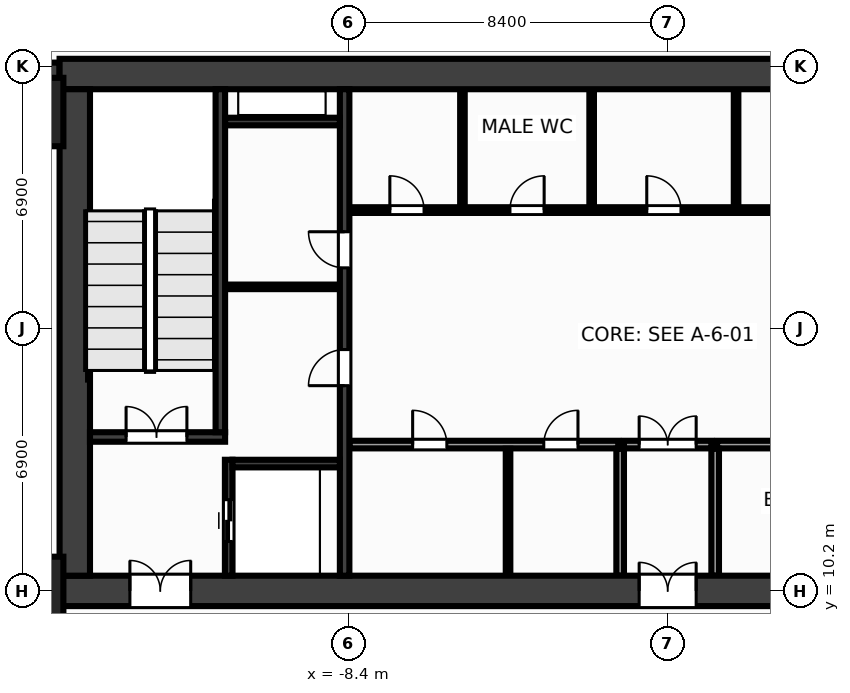
"""IFC4 building model, lengths in metres.
Left out: names, types, materials, properties, quantities, classifications, styles, units other than length and angle.
Written with IfcOpenShell. Run it as: python <this file> out.ifc"""

import sys

from ifc_helpers import new_model, si_unit, direction, frame, frame_2d, origin, origin_2d, place, context, subcontext, project, spatial, rectangle, extrude, source, transform, mapped, element, fill, save


model = new_model("IFC4")
c1 = context("Model", 3, precision=1e-05, world=origin(), true_north=direction((0.0, 1.0)))
c2 = subcontext(c1, "Body", "Model", "MODEL_VIEW")
j1 = project(units=[si_unit("LENGTHUNIT", "METRE"), si_unit("PLANEANGLEUNIT", "RADIAN")], contexts=[c1])
p1 = place(None, origin())
s1 = spatial("IfcSite", under=j1, at=p1, CompositionType="ELEMENT")
p2 = place(p1, origin())
s2 = spatial("IfcBuilding", under=s1, at=p2, CompositionType="ELEMENT")
p3 = place(p2, frame((0.0, 0.0, -5.5)))
s3 = spatial("IfcBuildingStorey", under=s2, at=p3, CompositionType="ELEMENT", Elevation=-5.5)
m1 = source(origin(), c2, "Body", "SweptSolid", [
    extrude(rectangle(XDim=22.9, YDim=0.6, at=frame_2d((11.45, 0.0))), origin(), (0.0, 0.0, 1.0), 5.5),
])
p4 = place(p3, frame((-38.9, 23.8, 0.0), z_axis=(0.0, 0.0, 1.0), x_axis=(1.0, 0.0, 0.0)))
e1 = element("IfcWall", 1, at=p4, inside=s3, PredefinedType="SHEAR", context=c2, shape_type="MappedRepresentation", body=[
    mapped(m1, transform((0.0, 0.0, 0.0), x_axis=(1.0, 0.0, 0.0), y_axis=(0.0, 1.0, 0.0), z_axis=(0.0, 0.0, 1.0), scale=1.0)),
])
m2 = source(origin(), c2, "Body", "SweptSolid", [
    extrude(rectangle(XDim=32.0, YDim=0.8, at=frame_2d((16.0, 0.0))), origin(), (0.0, 0.0, 1.0), 5.5),
])
p5 = place(p3, frame((-16.0, 23.8, 0.0), z_axis=(0.0, 0.0, 1.0), x_axis=(1.0, 0.0, 0.0)))
e2 = element("IfcWall", 2, at=p5, inside=s3, PredefinedType="SHEAR", context=c2, shape_type="MappedRepresentation", body=[
    mapped(m2, transform((0.0, 0.0, 0.0), x_axis=(1.0, 0.0, 0.0), y_axis=(0.0, 1.0, 0.0), z_axis=(0.0, 0.0, 1.0), scale=1.0)),
])
p6 = place(p3, frame((-16.0, 10.2, 0.0), z_axis=(0.0, 0.0, 1.0), x_axis=(1.0, 0.0, 0.0)))
e3 = element("IfcWall", 3, at=p6, inside=s3, PredefinedType="SHEAR", context=c2, shape_type="MappedRepresentation", body=[
    mapped(m2, transform((0.0, 0.0, 0.0), x_axis=(1.0, 0.0, 0.0), y_axis=(0.0, 1.0, 0.0), z_axis=(0.0, 0.0, 1.0), scale=1.0)),
])
p7 = place(p6, frame((1.85, 0.0, 0.0)))
e4 = element("IfcOpeningElement", 4, at=p7, cuts=e3, PredefinedType="OPENING", context=c2, shape_type="SweptSolid", body=[
    extrude(rectangle(XDim=1.6, YDim=2.15, at=frame_2d((0.8, 1.075))), frame((0.0, 0.412, 0.0), z_axis=(0.0, -1.0, 0.0), x_axis=(1.0, 0.0, 0.0)), (0.0, 0.0, 1.0), 0.824),
])
p8 = place(p6, frame((28.55, 0.0, 0.0)))
e5 = element("IfcOpeningElement", 5, at=p8, cuts=e3, PredefinedType="OPENING", context=c2, shape_type="SweptSolid", body=[
    extrude(rectangle(XDim=1.6, YDim=2.15, at=frame_2d((0.8, 1.075))), frame((0.0, 0.412, 0.0), z_axis=(0.0, -1.0, 0.0), x_axis=(1.0, 0.0, 0.0)), (0.0, 0.0, 1.0), 0.824),
])
p9 = place(p6, frame((15.25, 0.0, 0.0)))
e6 = element("IfcOpeningElement", 6, at=p9, cuts=e3, PredefinedType="OPENING", context=c2, shape_type="SweptSolid", body=[
    extrude(rectangle(XDim=1.5, YDim=2.2, at=frame_2d((0.75, 1.1))), frame((0.0, 0.412, 0.0), z_axis=(0.0, -1.0, 0.0), x_axis=(1.0, 0.0, 0.0)), (0.0, 0.0, 1.0), 0.824),
])
m3 = source(origin(), c2, "Body", "SweptSolid", [
    extrude(rectangle(XDim=12.8, YDim=0.8, at=frame_2d((6.4, 0.0))), origin(), (0.0, 0.0, 1.0), 5.5),
])
p10 = place(p3, frame((-15.6, 10.6, 0.0), z_axis=(0.0, 0.0, 1.0), x_axis=(0.0, 1.0, 0.0)))
e7 = element("IfcWall", 7, at=p10, inside=s3, PredefinedType="SHEAR", context=c2, shape_type="MappedRepresentation", body=[
    mapped(m3, transform((0.0, 0.0, 0.0), x_axis=(1.0, 0.0, 0.0), y_axis=(0.0, 1.0, 0.0), z_axis=(0.0, 0.0, 1.0), scale=1.0)),
])
m4 = source(origin(), c2, "Body", "SweptSolid", [
    extrude(rectangle(XDim=12.8, YDim=0.25, at=frame_2d((6.4, 0.0))), origin(), (0.0, 0.0, 1.0), 5.5),
])
p11 = place(p3, frame((-8.5, 10.6, 0.0), z_axis=(0.0, 0.0, 1.0), x_axis=(0.0, 1.0, 0.0)))
e8 = element("IfcWall", 8, at=p11, inside=s3, PredefinedType="SHEAR", context=c2, shape_type="MappedRepresentation", body=[
    mapped(m4, transform((0.0, 0.0, 0.0), x_axis=(1.0, 0.0, 0.0), y_axis=(0.0, 1.0, 0.0), z_axis=(0.0, 0.0, 1.0), scale=1.0)),
])
p12 = place(p11, frame((5.0, 0.0, 0.0)))
e9 = element("IfcOpeningElement", 9, at=p12, cuts=e8, PredefinedType="OPENING", context=c2, shape_type="SweptSolid", body=[
    extrude(rectangle(XDim=0.95, YDim=2.15, at=frame_2d((0.475, 1.075))), frame((0.0, 0.137, 0.0), z_axis=(0.0, -1.0, 0.0), x_axis=(1.0, 0.0, 0.0)), (0.0, 0.0, 1.0), 0.274),
])
p13 = place(p11, frame((8.1, 0.0, 0.0)))
e10 = element("IfcOpeningElement", 10, at=p13, cuts=e8, PredefinedType="OPENING", context=c2, shape_type="SweptSolid", body=[
    extrude(rectangle(XDim=0.95, YDim=2.15, at=frame_2d((0.475, 1.075))), frame((0.0, 0.137, 0.0), z_axis=(0.0, -1.0, 0.0), x_axis=(1.0, 0.0, 0.0)), (0.0, 0.0, 1.0), 0.274),
])
m5 = source(origin(), c2, "Body", "SweptSolid", [
    extrude(rectangle(XDim=3.555, YDim=0.25, at=frame_2d((1.777, 0.0))), origin(), (0.0, 0.0, 1.0), 5.5),
])
p14 = place(p3, frame((-15.2, 14.25, 0.0), z_axis=(0.0, 0.0, 1.0), x_axis=(1.0, 0.0, 0.0)))
e11 = element("IfcWall", 11, at=p14, inside=s3, PredefinedType="SHEAR", context=c2, shape_type="MappedRepresentation", body=[
    mapped(m5, transform((0.0, 0.0, 0.0), x_axis=(1.0, 0.0, 0.0), y_axis=(0.0, 1.0, 0.0), z_axis=(0.0, 0.0, 1.0), scale=1.0)),
])
p15 = place(p14, frame((0.95, 0.0, 0.0)))
e12 = element("IfcOpeningElement", 12, at=p15, cuts=e11, PredefinedType="OPENING", context=c2, shape_type="SweptSolid", body=[
    extrude(rectangle(XDim=1.6, YDim=2.15, at=frame_2d((0.8, 1.075))), frame((0.0, 0.137, 0.0), z_axis=(0.0, -1.0, 0.0), x_axis=(1.0, 0.0, 0.0)), (0.0, 0.0, 1.0), 0.274),
])
m6 = source(origin(), c2, "Body", "SweptSolid", [
    extrude(rectangle(XDim=9.025, YDim=0.25, at=frame_2d((4.512, 0.0))), origin(), (0.0, 0.0, 1.0), 5.5),
])
p16 = place(p3, frame((-11.77, 14.375, 0.0), z_axis=(0.0, 0.0, 1.0), x_axis=(0.0, 1.0, 0.0)))
e13 = element("IfcWall", 13, at=p16, inside=s3, PredefinedType="SHEAR", context=c2, shape_type="MappedRepresentation", body=[
    mapped(m6, transform((0.0, 0.0, 0.0), x_axis=(1.0, 0.0, 0.0), y_axis=(0.0, 1.0, 0.0), z_axis=(0.0, 0.0, 1.0), scale=1.0)),
])
m7 = source(origin(), c2, "Body", "SweptSolid", [
    extrude(rectangle(XDim=3.05, YDim=0.2, at=frame_2d((1.525, 0.0))), origin(), (0.0, 0.0, 1.0), 5.5),
])
p17 = place(p3, frame((-11.55, 10.6, 0.0), z_axis=(0.0, 0.0, 1.0), x_axis=(0.0, 1.0, 0.0)))
e14 = element("IfcWall", 14, at=p17, inside=s3, PredefinedType="SHEAR", context=c2, shape_type="MappedRepresentation", body=[
    mapped(m7, transform((0.0, 0.0, 0.0), x_axis=(1.0, 0.0, 0.0), y_axis=(0.0, 1.0, 0.0), z_axis=(0.0, 0.0, 1.0), scale=1.0)),
])
p18 = place(p17, frame((0.9, 0.0, 0.0)))
e15 = element("IfcOpeningElement", 15, at=p18, cuts=e14, PredefinedType="OPENING", context=c2, shape_type="SweptSolid", body=[
    extrude(rectangle(XDim=1.1, YDim=2.15, at=frame_2d((0.55, 1.075))), frame((0.0, 0.112, 0.0), z_axis=(0.0, -1.0, 0.0), x_axis=(1.0, 0.0, 0.0)), (0.0, 0.0, 1.0), 0.224),
])
m8 = source(origin(), c2, "Body", "SweptSolid", [
    extrude(rectangle(XDim=2.825, YDim=0.2, at=frame_2d((1.413, 0.0))), origin(), (0.0, 0.0, 1.0), 5.5),
])
p19 = place(p3, frame((-11.45, 13.55, 0.0), z_axis=(0.0, 0.0, 1.0), x_axis=(1.0, 0.0, 0.0)))
e16 = element("IfcWall", 16, at=p19, inside=s3, PredefinedType="SHEAR", context=c2, shape_type="MappedRepresentation", body=[
    mapped(m8, transform((0.0, 0.0, 0.0), x_axis=(1.0, 0.0, 0.0), y_axis=(0.0, 1.0, 0.0), z_axis=(0.0, 0.0, 1.0), scale=1.0)),
])
m9 = source(origin(), c2, "Body", "SweptSolid", [
    extrude(rectangle(XDim=3.02, YDim=0.2, at=frame_2d((1.51, 0.0))), origin(), (0.0, 0.0, 1.0), 5.5),
])
p20 = place(p3, frame((-11.645, 22.55, 0.0), z_axis=(0.0, 0.0, 1.0), x_axis=(1.0, 0.0, 0.0)))
e17 = element("IfcWall", 17, at=p20, inside=s3, PredefinedType="SHEAR", context=c2, shape_type="MappedRepresentation", body=[
    mapped(m9, transform((0.0, 0.0, 0.0), x_axis=(1.0, 0.0, 0.0), y_axis=(0.0, 1.0, 0.0), z_axis=(0.0, 0.0, 1.0), scale=1.0)),
])
m10 = source(origin(), c2, "Body", "SweptSolid", [
    extrude(rectangle(XDim=1.8, YDim=1.8, at=origin_2d()), origin(), (0.0, 0.0, 1.0), 5.5),
])
for number, where, z_axis, x_axis in (
    (18, (-16.8, 10.2, 0.0), (0.0, 0.0, 1.0), (1.0, 0.0, 0.0)),
    (19, (-16.8, 22.8, 0.0), (0.0, 0.0, 1.0), (1.0, 0.0, 0.0)),
):
    element("IfcColumn", number, at=place(p3, frame(where, z_axis=z_axis, x_axis=x_axis)), inside=s3, PredefinedType="COLUMN", context=c2, shape_type="MappedRepresentation", body=[
        mapped(m10, transform((0.0, 0.0, 0.0), x_axis=(1.0, 0.0, 0.0), y_axis=(0.0, 1.0, 0.0), z_axis=(0.0, 0.0, 1.0), scale=1.0)),
    ])
m11 = source(origin(), c2, "Body", "SweptSolid", [
    extrude(rectangle(XDim=3.01, YDim=0.12, at=frame_2d((1.505, 0.0))), origin(), (0.0, 0.0, 1.0), 5.14),
])
p21 = place(p3, frame((-11.64, 18.2, 0.0), z_axis=(0.0, 0.0, 1.0), x_axis=(1.0, 0.0, 0.0)))
e20 = element("IfcWall", 20, at=p21, inside=s3, PredefinedType="PARTITIONING", context=c2, shape_type="MappedRepresentation", body=[
    mapped(m11, transform((0.0, 0.0, 0.0), x_axis=(1.0, 0.0, 0.0), y_axis=(0.0, 1.0, 0.0), z_axis=(0.0, 0.0, 1.0), scale=1.0)),
])
m12 = source(origin(), c2, "Body", "SweptSolid", [
    extrude(rectangle(XDim=7.07, YDim=0.2, at=frame_2d((3.535, 0.0))), origin(), (0.0, 0.0, 1.0), 5.14),
])
p22 = place(p3, frame((-8.37, 14.05, 0.0), z_axis=(0.0, 0.0, 1.0), x_axis=(1.0, 0.0, 0.0)))
e21 = element("IfcWall", 21, at=p22, inside=s3, PredefinedType="PARTITIONING", context=c2, shape_type="MappedRepresentation", body=[
    mapped(m12, transform((0.0, 0.0, 0.0), x_axis=(1.0, 0.0, 0.0), y_axis=(0.0, 1.0, 0.0), z_axis=(0.0, 0.0, 1.0), scale=1.0)),
])
p23 = place(p22, frame((1.66, 0.0, 0.0)))
e22 = element("IfcOpeningElement", 22, at=p23, cuts=e21, PredefinedType="OPENING", context=c2, shape_type="SweptSolid", body=[
    extrude(rectangle(XDim=0.9, YDim=2.15, at=frame_2d((0.45, 1.075))), frame((0.0, 0.112, 0.0), z_axis=(0.0, -1.0, 0.0), x_axis=(1.0, 0.0, 0.0)), (0.0, 0.0, 1.0), 0.224),
])
p24 = place(p22, frame((5.11, 0.0, 0.0)))
e23 = element("IfcOpeningElement", 23, at=p24, cuts=e21, PredefinedType="OPENING", context=c2, shape_type="SweptSolid", body=[
    extrude(rectangle(XDim=0.9, YDim=2.15, at=frame_2d((0.45, 1.075))), frame((0.0, 0.112, 0.0), z_axis=(0.0, -1.0, 0.0), x_axis=(1.0, 0.0, 0.0)), (0.0, 0.0, 1.0), 0.224),
])
p25 = place(p3, frame((1.3, 14.05, 0.0), z_axis=(0.0, 0.0, 1.0), x_axis=(1.0, 0.0, 0.0)))
e24 = element("IfcWall", 24, at=p25, inside=s3, PredefinedType="PARTITIONING", context=c2, shape_type="MappedRepresentation", body=[
    mapped(m12, transform((0.0, 0.0, 0.0), x_axis=(1.0, 0.0, 0.0), y_axis=(0.0, 1.0, 0.0), z_axis=(0.0, 0.0, 1.0), scale=1.0)),
])
p26 = place(p25, frame((2.8, 0.0, 0.0)))
e25 = element("IfcOpeningElement", 25, at=p26, cuts=e24, PredefinedType="OPENING", context=c2, shape_type="SweptSolid", body=[
    extrude(rectangle(XDim=0.98, YDim=2.15, at=frame_2d((0.49, 1.075))), frame((0.0, 0.112, 0.0), z_axis=(0.0, -1.0, 0.0), x_axis=(1.0, 0.0, 0.0)), (0.0, 0.0, 1.0), 0.224),
])
m13 = source(origin(), c2, "Body", "SweptSolid", [
    extrude(rectangle(XDim=3.34, YDim=0.2, at=frame_2d((1.67, 0.0))), origin(), (0.0, 0.0, 1.0), 5.14),
])
for number, where, z_axis, x_axis in (
    (26, (-1.25, 10.6, 0.0), (0.0, 0.0, 1.0), (0.0, 1.0, 0.0)),
    (27, (1.25, 10.6, 0.0), (0.0, 0.0, 1.0), (0.0, 1.0, 0.0)),
):
    element("IfcWall", number, at=place(p3, frame(where, z_axis=z_axis, x_axis=x_axis)), inside=s3, PredefinedType="PARTITIONING", context=c2, shape_type="MappedRepresentation", body=[
        mapped(m13, transform((0.0, 0.0, 0.0), x_axis=(1.0, 0.0, 0.0), y_axis=(0.0, 1.0, 0.0), z_axis=(0.0, 0.0, 1.0), scale=1.0)),
    ])
m14 = source(origin(), c2, "Body", "SweptSolid", [
    extrude(rectangle(XDim=2.3, YDim=0.2, at=frame_2d((1.15, 0.0))), origin(), (0.0, 0.0, 1.0), 5.14),
])
p27 = place(p3, frame((-1.15, 14.05, 0.0), z_axis=(0.0, 0.0, 1.0), x_axis=(1.0, 0.0, 0.0)))
e28 = element("IfcWall", 28, at=p27, inside=s3, PredefinedType="PARTITIONING", context=c2, shape_type="MappedRepresentation", body=[
    mapped(m14, transform((0.0, 0.0, 0.0), x_axis=(1.0, 0.0, 0.0), y_axis=(0.0, 1.0, 0.0), z_axis=(0.0, 0.0, 1.0), scale=1.0)),
])
p28 = place(p27, frame((0.4, 0.0, 0.0)))
e29 = element("IfcOpeningElement", 29, at=p28, cuts=e28, PredefinedType="OPENING", context=c2, shape_type="SweptSolid", body=[
    extrude(rectangle(XDim=1.5, YDim=2.2, at=frame_2d((0.75, 1.1))), frame((0.0, 0.112, 0.0), z_axis=(0.0, -1.0, 0.0), x_axis=(1.0, 0.0, 0.0)), (0.0, 0.0, 1.0), 0.224),
])
m15 = source(origin(), c2, "Body", "SweptSolid", [
    extrude(rectangle(XDim=14.59, YDim=0.15, at=frame_2d((7.295, 0.0))), origin(), (0.0, 0.0, 1.0), 5.14),
])
p29 = place(p3, frame((-8.37, 20.22, 0.0), z_axis=(0.0, 0.0, 1.0), x_axis=(1.0, 0.0, 0.0)))
e30 = element("IfcWall", 30, at=p29, inside=s3, PredefinedType="PARTITIONING", context=c2, shape_type="MappedRepresentation", body=[
    mapped(m15, transform((0.0, 0.0, 0.0), x_axis=(1.0, 0.0, 0.0), y_axis=(0.0, 1.0, 0.0), z_axis=(0.0, 0.0, 1.0), scale=1.0)),
])
p30 = place(p29, frame((1.06, 0.0, 0.0)))
e31 = element("IfcOpeningElement", 31, at=p30, cuts=e30, PredefinedType="OPENING", context=c2, shape_type="SweptSolid", body=[
    extrude(rectangle(XDim=0.9, YDim=2.15, at=frame_2d((0.45, 1.075))), frame((0.0, 0.087, 0.0), z_axis=(0.0, -1.0, 0.0), x_axis=(1.0, 0.0, 0.0)), (0.0, 0.0, 1.0), 0.174),
])
p31 = place(p29, frame((4.22, 0.0, 0.0)))
e32 = element("IfcOpeningElement", 32, at=p31, cuts=e30, PredefinedType="OPENING", context=c2, shape_type="SweptSolid", body=[
    extrude(rectangle(XDim=0.9, YDim=2.15, at=frame_2d((0.45, 1.075))), frame((0.0, 0.087, 0.0), z_axis=(0.0, -1.0, 0.0), x_axis=(1.0, 0.0, 0.0)), (0.0, 0.0, 1.0), 0.174),
])
p32 = place(p29, frame((7.82, 0.0, 0.0)))
e33 = element("IfcOpeningElement", 33, at=p32, cuts=e30, PredefinedType="OPENING", context=c2, shape_type="SweptSolid", body=[
    extrude(rectangle(XDim=0.9, YDim=2.15, at=frame_2d((0.45, 1.075))), frame((0.0, 0.087, 0.0), z_axis=(0.0, -1.0, 0.0), x_axis=(1.0, 0.0, 0.0)), (0.0, 0.0, 1.0), 0.174),
])
p33 = place(p29, frame((11.87, 0.0, 0.0)))
e34 = element("IfcOpeningElement", 34, at=p33, cuts=e30, PredefinedType="OPENING", context=c2, shape_type="SweptSolid", body=[
    extrude(rectangle(XDim=0.9, YDim=2.15, at=frame_2d((0.45, 1.075))), frame((0.0, 0.087, 0.0), z_axis=(0.0, -1.0, 0.0), x_axis=(1.0, 0.0, 0.0)), (0.0, 0.0, 1.0), 0.174),
])
m16 = source(origin(), c2, "Body", "SweptSolid", [
    extrude(rectangle(XDim=3.34, YDim=0.12, at=frame_2d((1.67, 0.0))), origin(), (0.0, 0.0, 1.0), 5.14),
])
p34 = place(p3, frame((-4.2, 10.6, 0.0), z_axis=(0.0, 0.0, 1.0), x_axis=(0.0, 1.0, 0.0)))
e35 = element("IfcWall", 35, at=p34, inside=s3, PredefinedType="PARTITIONING", context=c2, shape_type="MappedRepresentation", body=[
    mapped(m16, transform((0.0, 0.0, 0.0), x_axis=(1.0, 0.0, 0.0), y_axis=(0.0, 1.0, 0.0), z_axis=(0.0, 0.0, 1.0), scale=1.0)),
])
m17 = source(origin(), c2, "Body", "SweptSolid", [
    extrude(rectangle(XDim=3.04, YDim=0.12, at=frame_2d((1.52, 0.0))), origin(), (0.0, 0.0, 1.0), 5.14),
])
for number, where, z_axis, x_axis in (
    (36, (-5.4, 20.32, 0.0), (0.0, 0.0, 1.0), (0.0, 1.0, 0.0)),
    (37, (-2.0, 20.32, 0.0), (0.0, 0.0, 1.0), (0.0, 1.0, 0.0)),
    (38, (1.8, 20.32, 0.0), (0.0, 0.0, 1.0), (0.0, 1.0, 0.0)),
):
    element("IfcWall", number, at=place(p3, frame(where, z_axis=z_axis, x_axis=x_axis)), inside=s3, PredefinedType="PARTITIONING", context=c2, shape_type="MappedRepresentation", body=[
        mapped(m17, transform((0.0, 0.0, 0.0), x_axis=(1.0, 0.0, 0.0), y_axis=(0.0, 1.0, 0.0), z_axis=(0.0, 0.0, 1.0), scale=1.0)),
    ])
m18 = source(origin(), c2, "Body", "SweptSolid", [
    extrude(rectangle(XDim=1.6, YDim=2.15, at=frame_2d((0.8, 1.075))), frame((0.0, 0.025, 0.0), z_axis=(0.0, -1.0, 0.0), x_axis=(1.0, 0.0, 0.0)), (0.0, 0.0, 1.0), 0.05),
])
p35 = place(p15, origin())
e39 = element("IfcDoor", 39, at=p35, inside=s3, OperationType="DOUBLE_DOOR_SINGLE_SWING", PredefinedType="DOOR", context=c2, shape_type="MappedRepresentation", body=[
    mapped(m18, transform((0.0, 0.0, 0.0), x_axis=(1.0, 0.0, 0.0), y_axis=(0.0, 1.0, 0.0), z_axis=(0.0, 0.0, 1.0), scale=1.0)),
])
fill(e12, e39)
p36 = place(p7, origin())
e40 = element("IfcDoor", 40, at=p36, inside=s3, OperationType="DOUBLE_DOOR_SINGLE_SWING", PredefinedType="DOOR", context=c2, shape_type="MappedRepresentation", body=[
    mapped(m18, transform((0.0, 0.0, 0.0), x_axis=(1.0, 0.0, 0.0), y_axis=(0.0, 1.0, 0.0), z_axis=(0.0, 0.0, 1.0), scale=1.0)),
])
fill(e4, e40)
m19 = source(origin(), c2, "Body", "SweptSolid", [
    extrude(rectangle(XDim=1.1, YDim=2.15, at=frame_2d((0.55, 1.075))), frame((0.0, 0.025, 0.0), z_axis=(0.0, -1.0, 0.0), x_axis=(1.0, 0.0, 0.0)), (0.0, 0.0, 1.0), 0.05),
])
p37 = place(p18, origin())
e41 = element("IfcDoor", 41, at=p37, inside=s3, OperationType="DOUBLE_DOOR_SLIDING", PredefinedType="DOOR", context=c2, shape_type="MappedRepresentation", body=[
    mapped(m19, transform((0.0, 0.0, 0.0), x_axis=(1.0, 0.0, 0.0), y_axis=(0.0, 1.0, 0.0), z_axis=(0.0, 0.0, 1.0), scale=1.0)),
])
fill(e15, e41)
m20 = source(origin(), c2, "Body", "SweptSolid", [
    extrude(rectangle(XDim=0.95, YDim=2.15, at=frame_2d((0.475, 1.075))), frame((0.0, 0.025, 0.0), z_axis=(0.0, -1.0, 0.0), x_axis=(1.0, 0.0, 0.0)), (0.0, 0.0, 1.0), 0.05),
])
p38 = place(p12, origin())
e42 = element("IfcDoor", 42, at=p38, inside=s3, OperationType="SINGLE_SWING_LEFT", PredefinedType="DOOR", context=c2, shape_type="MappedRepresentation", body=[
    mapped(m20, transform((0.0, 0.0, 0.0), x_axis=(1.0, 0.0, 0.0), y_axis=(0.0, 1.0, 0.0), z_axis=(0.0, 0.0, 1.0), scale=1.0)),
])
fill(e9, e42)
p39 = place(p13, origin())
e43 = element("IfcDoor", 43, at=p39, inside=s3, OperationType="SINGLE_SWING_RIGHT", PredefinedType="DOOR", context=c2, shape_type="MappedRepresentation", body=[
    mapped(m20, transform((0.0, 0.0, 0.0), x_axis=(1.0, 0.0, 0.0), y_axis=(0.0, 1.0, 0.0), z_axis=(0.0, 0.0, 1.0), scale=1.0)),
])
fill(e10, e43)
m21 = source(origin(), c2, "Body", "SweptSolid", [
    extrude(rectangle(XDim=0.9, YDim=2.15, at=frame_2d((0.45, 1.075))), frame((0.0, 0.025, 0.0), z_axis=(0.0, -1.0, 0.0), x_axis=(1.0, 0.0, 0.0)), (0.0, 0.0, 1.0), 0.05),
])
p40 = place(p23, origin())
e44 = element("IfcDoor", 44, at=p40, inside=s3, OperationType="SINGLE_SWING_LEFT", PredefinedType="DOOR", context=c2, shape_type="MappedRepresentation", body=[
    mapped(m21, transform((0.0, 0.0, 0.0), x_axis=(1.0, 0.0, 0.0), y_axis=(0.0, 1.0, 0.0), z_axis=(0.0, 0.0, 1.0), scale=1.0)),
])
fill(e22, e44)
p41 = place(p24, origin())
e45 = element("IfcDoor", 45, at=p41, inside=s3, OperationType="SINGLE_SWING_RIGHT", PredefinedType="DOOR", context=c2, shape_type="MappedRepresentation", body=[
    mapped(m21, transform((0.0, 0.0, 0.0), x_axis=(1.0, 0.0, 0.0), y_axis=(0.0, 1.0, 0.0), z_axis=(0.0, 0.0, 1.0), scale=1.0)),
])
fill(e23, e45)
m22 = source(origin(), c2, "Body", "SweptSolid", [
    extrude(rectangle(XDim=1.5, YDim=2.2, at=frame_2d((0.75, 1.1))), frame((0.0, 0.025, 0.0), z_axis=(0.0, -1.0, 0.0), x_axis=(1.0, 0.0, 0.0)), (0.0, 0.0, 1.0), 0.05),
])
p42 = place(p28, origin())
e46 = element("IfcDoor", 46, at=p42, inside=s3, OperationType="DOUBLE_DOOR_SINGLE_SWING", PredefinedType="DOOR", context=c2, shape_type="MappedRepresentation", body=[
    mapped(m22, transform((0.0, 0.0, 0.0), x_axis=(1.0, 0.0, 0.0), y_axis=(0.0, 1.0, 0.0), z_axis=(0.0, 0.0, 1.0), scale=1.0)),
])
fill(e29, e46)
p43 = place(p9, origin())
e47 = element("IfcDoor", 47, at=p43, inside=s3, OperationType="DOUBLE_DOOR_SINGLE_SWING", PredefinedType="DOOR", context=c2, shape_type="MappedRepresentation", body=[
    mapped(m22, transform((0.0, 0.0, 0.0), x_axis=(1.0, 0.0, 0.0), y_axis=(0.0, 1.0, 0.0), z_axis=(0.0, 0.0, 1.0), scale=1.0)),
])
fill(e6, e47)
p44 = place(p30, origin())
e48 = element("IfcDoor", 48, at=p44, inside=s3, OperationType="SINGLE_SWING_LEFT", PredefinedType="DOOR", context=c2, shape_type="MappedRepresentation", body=[
    mapped(m21, transform((0.0, 0.0, 0.0), x_axis=(1.0, 0.0, 0.0), y_axis=(0.0, 1.0, 0.0), z_axis=(0.0, 0.0, 1.0), scale=1.0)),
])
fill(e31, e48)
p45 = place(p31, origin())
e49 = element("IfcDoor", 49, at=p45, inside=s3, OperationType="SINGLE_SWING_RIGHT", PredefinedType="DOOR", context=c2, shape_type="MappedRepresentation", body=[
    mapped(m21, transform((0.0, 0.0, 0.0), x_axis=(1.0, 0.0, 0.0), y_axis=(0.0, 1.0, 0.0), z_axis=(0.0, 0.0, 1.0), scale=1.0)),
])
fill(e32, e49)
p46 = place(p32, origin())
e50 = element("IfcDoor", 50, at=p46, inside=s3, OperationType="SINGLE_SWING_LEFT", PredefinedType="DOOR", context=c2, shape_type="MappedRepresentation", body=[
    mapped(m21, transform((0.0, 0.0, 0.0), x_axis=(1.0, 0.0, 0.0), y_axis=(0.0, 1.0, 0.0), z_axis=(0.0, 0.0, 1.0), scale=1.0)),
])
fill(e33, e50)
save(model, sys.argv[1])
